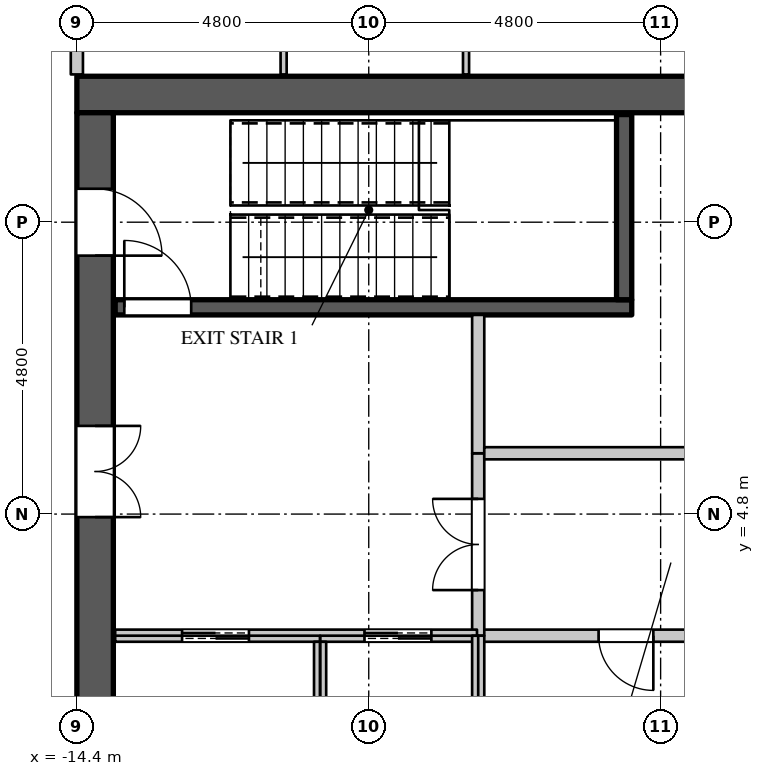
"""IFC4 building model, lengths in metres.
Left out: names, types, materials, properties, quantities, classifications, styles, units other than length and angle.
Written with IfcOpenShell. Run it as: python <this file> out.ifc"""

import sys

from ifc_helpers import new_model, si_unit, direction, frame, frame_2d, origin, place, context, subcontext, project, spatial, rectangle, extrude, element, fill, save


model = new_model("IFC4")
c1 = context("Model", 3, precision=1e-05, world=origin(), true_north=direction((0.0, 1.0)))
c2 = subcontext(c1, "Body", "Model", "MODEL_VIEW")
j1 = project(units=[si_unit("LENGTHUNIT", "METRE"), si_unit("PLANEANGLEUNIT", "RADIAN")], contexts=[c1])
p1 = place(None, origin())
s1 = spatial("IfcSite", under=j1, at=p1, CompositionType="ELEMENT")
p2 = place(p1, origin())
s2 = spatial("IfcBuilding", under=s1, at=p2, CompositionType="ELEMENT")
p3 = place(p2, frame((0.0, 0.0, 272.7)))
s3 = spatial("IfcBuildingStorey", under=s2, at=p3, CompositionType="ELEMENT", Elevation=272.7)
p4 = place(p3, frame((-14.4, 11.7, 0.0), z_axis=(0.0, 0.0, 1.0), x_axis=(1.0, 0.0, 0.0)))
e1 = element("IfcWall", 1, at=p4, inside=s3, PredefinedType="SHEAR", context=c2, shape_type="SweptSolid", body=[
    extrude(rectangle(XDim=28.8, YDim=0.6, at=frame_2d((14.4, 0.0))), origin(), (0.0, 0.0, 1.0), 4.2),
])
p5 = place(p3, frame((-14.1, -11.4, 0.0), z_axis=(0.0, 0.0, 1.0), x_axis=(0.0, 1.0, 0.0)))
e2 = element("IfcWall", 2, at=p5, inside=s3, PredefinedType="SHEAR", context=c2, shape_type="SweptSolid", body=[
    extrude(rectangle(XDim=22.8, YDim=0.6, at=frame_2d((11.4, 0.0))), origin(), (0.0, 0.0, 1.0), 4.2),
])
p6 = place(p5, frame((20.45, 0.0, 0.0)))
e3 = element("IfcOpeningElement", 3, at=p6, cuts=e2, PredefinedType="OPENING", context=c2, shape_type="SweptSolid", body=[
    extrude(rectangle(XDim=1.1, YDim=2.2, at=frame_2d((0.55, 1.1))), frame((0.0, 0.31, 0.0), z_axis=(0.0, -1.0, 0.0), x_axis=(1.0, 0.0, 0.0)), (0.0, 0.0, 1.0), 0.62),
])
p7 = place(p5, frame((1.25, 0.0, 0.0)))
e4 = element("IfcOpeningElement", 4, at=p7, cuts=e2, PredefinedType="OPENING", context=c2, shape_type="SweptSolid", body=[
    extrude(rectangle(XDim=1.1, YDim=2.2, at=frame_2d((0.55, 1.1))), frame((0.0, 0.31, 0.0), z_axis=(0.0, -1.0, 0.0), x_axis=(1.0, 0.0, 0.0)), (0.0, 0.0, 1.0), 0.62),
])
p8 = place(p5, frame((16.15, 0.0, 0.0)))
e5 = element("IfcOpeningElement", 5, at=p8, cuts=e2, PredefinedType="OPENING", context=c2, shape_type="SweptSolid", body=[
    extrude(rectangle(XDim=1.5, YDim=2.4, at=frame_2d((0.75, 1.2))), frame((0.0, 0.31, 0.0), z_axis=(0.0, -1.0, 0.0), x_axis=(1.0, 0.0, 0.0)), (0.0, 0.0, 1.0), 0.62),
])
p9 = place(p5, frame((5.15, 0.0, 0.0)))
e6 = element("IfcOpeningElement", 6, at=p9, cuts=e2, PredefinedType="OPENING", context=c2, shape_type="SweptSolid", body=[
    extrude(rectangle(XDim=1.5, YDim=2.4, at=frame_2d((0.75, 1.2))), frame((0.0, 0.31, 0.0), z_axis=(0.0, -1.0, 0.0), x_axis=(1.0, 0.0, 0.0)), (0.0, 0.0, 1.0), 0.62),
])
p10 = place(p3, frame((-14.4, 12.03, 0.0), z_axis=(0.0, 0.0, 1.0), x_axis=(0.0, 1.0, 0.0)))
e7 = element("IfcWall", 7, at=p10, inside=s3, PredefinedType="PARTITIONING", context=c2, shape_type="SweptSolid", body=[
    extrude(rectangle(XDim=2.27, YDim=0.2, at=frame_2d((1.135, 0.0))), origin(), (0.0, 0.0, 1.0), 3.95),
])
p11 = place(p3, frame((-7.82, 2.8, 0.0), z_axis=(0.0, 0.0, 1.0), x_axis=(1.0, 0.0, 0.0)))
e8 = element("IfcWall", 8, at=p11, inside=s3, PredefinedType="PARTITIONING", context=c2, shape_type="SweptSolid", body=[
    extrude(rectangle(XDim=18.24, YDim=0.2, at=frame_2d((9.12, 0.0))), origin(), (0.0, 0.0, 1.0), 3.95),
])
p12 = place(p11, frame((2.0, 0.0, 0.0)))
e9 = element("IfcOpeningElement", 9, at=p12, cuts=e8, PredefinedType="OPENING", context=c2, shape_type="SweptSolid", body=[
    extrude(rectangle(XDim=0.9, YDim=2.2, at=frame_2d((0.45, 1.1))), frame((0.0, 0.11, 0.0), z_axis=(0.0, -1.0, 0.0), x_axis=(1.0, 0.0, 0.0)), (0.0, 0.0, 1.0), 0.22),
])
p13 = place(p11, frame((6.25, 0.0, 0.0)))
e10 = element("IfcOpeningElement", 10, at=p13, cuts=e8, PredefinedType="OPENING", context=c2, shape_type="SweptSolid", body=[
    extrude(rectangle(XDim=0.9, YDim=2.2, at=frame_2d((0.45, 1.1))), frame((0.0, 0.11, 0.0), z_axis=(0.0, -1.0, 0.0), x_axis=(1.0, 0.0, 0.0)), (0.0, 0.0, 1.0), 0.22),
])
p14 = place(p11, frame((9.65, 0.0, 0.0)))
e11 = element("IfcOpeningElement", 11, at=p14, cuts=e8, PredefinedType="OPENING", context=c2, shape_type="SweptSolid", body=[
    extrude(rectangle(XDim=0.9, YDim=2.2, at=frame_2d((0.45, 1.1))), frame((0.0, 0.11, 0.0), z_axis=(0.0, -1.0, 0.0), x_axis=(1.0, 0.0, 0.0)), (0.0, 0.0, 1.0), 0.22),
])
p15 = place(p11, frame((12.35, 0.0, 0.0)))
e12 = element("IfcOpeningElement", 12, at=p15, cuts=e8, PredefinedType="OPENING", context=c2, shape_type="SweptSolid", body=[
    extrude(rectangle(XDim=0.9, YDim=2.2, at=frame_2d((0.45, 1.1))), frame((0.0, 0.11, 0.0), z_axis=(0.0, -1.0, 0.0), x_axis=(1.0, 0.0, 0.0)), (0.0, 0.0, 1.0), 0.22),
])
p16 = place(p11, frame((15.6, 0.0, 0.0)))
e13 = element("IfcOpeningElement", 13, at=p16, cuts=e8, PredefinedType="OPENING", context=c2, shape_type="SweptSolid", body=[
    extrude(rectangle(XDim=0.9, YDim=2.2, at=frame_2d((0.45, 1.1))), frame((0.0, 0.11, 0.0), z_axis=(0.0, -1.0, 0.0), x_axis=(1.0, 0.0, 0.0)), (0.0, 0.0, 1.0), 0.22),
])
p17 = place(p3, frame((-7.8, 2.8, 0.0), z_axis=(0.0, 0.0, 1.0), x_axis=(0.0, 1.0, 0.0)))
e14 = element("IfcWall", 14, at=p17, inside=s3, PredefinedType="PARTITIONING", context=c2, shape_type="SweptSolid", body=[
    extrude(rectangle(XDim=3.0, YDim=0.2, at=frame_2d((1.5, 0.0))), origin(), (0.0, 0.0, 1.0), 3.95),
])
p18 = place(p17, frame((0.75, 0.0, 0.0)))
e15 = element("IfcOpeningElement", 15, at=p18, cuts=e14, PredefinedType="OPENING", context=c2, shape_type="SweptSolid", body=[
    extrude(rectangle(XDim=1.5, YDim=2.4, at=frame_2d((0.75, 1.2))), frame((0.0, 0.11, 0.0), z_axis=(0.0, -1.0, 0.0), x_axis=(1.0, 0.0, 0.0)), (0.0, 0.0, 1.0), 0.22),
])
p19 = place(p3, frame((-7.8, 5.8, 0.0), z_axis=(0.0, 0.0, 1.0), x_axis=(0.0, 1.0, 0.0)))
e16 = element("IfcWall", 16, at=p19, inside=s3, PredefinedType="PARTITIONING", context=c2, shape_type="SweptSolid", body=[
    extrude(rectangle(XDim=2.275, YDim=0.2, at=frame_2d((1.137, 0.0))), origin(), (0.0, 0.0, 1.0), 3.95),
])
p20 = place(p3, frame((-7.7, 5.8, 0.0), z_axis=(0.0, 0.0, 1.0), x_axis=(1.0, 0.0, 0.0)))
e17 = element("IfcWall", 17, at=p20, inside=s3, PredefinedType="PARTITIONING", context=c2, shape_type="SweptSolid", body=[
    extrude(rectangle(XDim=8.68, YDim=0.2, at=frame_2d((4.34, 0.0))), origin(), (0.0, 0.0, 1.0), 3.95),
])
p21 = place(p20, frame((3.9, 0.0, 0.0)))
e18 = element("IfcOpeningElement", 18, at=p21, cuts=e17, PredefinedType="OPENING", context=c2, shape_type="SweptSolid", body=[
    extrude(rectangle(XDim=0.9, YDim=2.2, at=frame_2d((0.45, 1.1))), frame((0.0, 0.11, 0.0), z_axis=(0.0, -1.0, 0.0), x_axis=(1.0, 0.0, 0.0)), (0.0, 0.0, 1.0), 0.22),
])
p22 = place(p3, frame((-13.77, 2.8, 0.0), z_axis=(0.0, 0.0, 1.0), x_axis=(1.0, 0.0, 0.0)))
e19 = element("IfcWall", 19, at=p22, inside=s3, PredefinedType="PARTITIONING", context=c2, shape_type="SweptSolid", body=[
    extrude(rectangle(XDim=5.95, YDim=0.2, at=frame_2d((2.975, 0.0))), origin(), (0.0, 0.0, 1.0), 3.95),
])
p23 = place(p22, frame((1.1, 0.0, 0.0)))
e20 = element("IfcOpeningElement", 20, at=p23, cuts=e19, PredefinedType="OPENING", context=c2, shape_type="SweptSolid", body=[
    extrude(rectangle(XDim=1.1, YDim=2.2, at=frame_2d((0.55, 1.1))), frame((0.0, 0.11, 0.0), z_axis=(0.0, -1.0, 0.0), x_axis=(1.0, 0.0, 0.0)), (0.0, 0.0, 1.0), 0.22),
])
p24 = place(p22, frame((4.1, 0.0, 0.0)))
e21 = element("IfcOpeningElement", 21, at=p24, cuts=e19, PredefinedType="OPENING", context=c2, shape_type="SweptSolid", body=[
    extrude(rectangle(XDim=1.1, YDim=2.2, at=frame_2d((0.55, 1.1))), frame((0.0, 0.11, 0.0), z_axis=(0.0, -1.0, 0.0), x_axis=(1.0, 0.0, 0.0)), (0.0, 0.0, 1.0), 0.22),
])
p25 = place(p3, frame((-10.4, 0.0, 0.0), z_axis=(0.0, 0.0, 1.0), x_axis=(0.0, 1.0, 0.0)))
e22 = element("IfcWall", 22, at=p25, inside=s3, PredefinedType="PARTITIONING", context=c2, shape_type="SweptSolid", body=[
    extrude(rectangle(XDim=2.7, YDim=0.2, at=frame_2d((1.35, 0.0))), origin(), (0.0, 0.0, 1.0), 3.95),
])
p26 = place(p3, frame((-7.8, 0.0, 0.0), z_axis=(0.0, 0.0, 1.0), x_axis=(0.0, 1.0, 0.0)))
e23 = element("IfcWall", 23, at=p26, inside=s3, PredefinedType="PARTITIONING", context=c2, shape_type="SweptSolid", body=[
    extrude(rectangle(XDim=2.8, YDim=0.2, at=frame_2d((1.4, 0.0))), origin(), (0.0, 0.0, 1.0), 3.95),
])
p27 = place(p3, frame((-13.77, 8.2, 0.0), z_axis=(0.0, 0.0, 1.0), x_axis=(1.0, 0.0, 0.0)))
e24 = element("IfcWall", 24, at=p27, inside=s3, PredefinedType="SHEAR", context=c2, shape_type="SweptSolid", body=[
    extrude(rectangle(XDim=8.495, YDim=0.25, at=frame_2d((4.248, 0.0))), origin(), (0.0, 0.0, 1.0), 3.95),
])
p28 = place(p27, frame((0.15, 0.0, 0.0)))
e25 = element("IfcOpeningElement", 25, at=p28, cuts=e24, PredefinedType="OPENING", context=c2, shape_type="SweptSolid", body=[
    extrude(rectangle(XDim=1.1, YDim=2.2, at=frame_2d((0.55, 1.1))), frame((0.0, 0.135, 0.0), z_axis=(0.0, -1.0, 0.0), x_axis=(1.0, 0.0, 0.0)), (0.0, 0.0, 1.0), 0.27),
])
p29 = place(p3, frame((-5.4, 8.325, 0.0), z_axis=(0.0, 0.0, 1.0), x_axis=(0.0, 1.0, 0.0)))
e26 = element("IfcWall", 26, at=p29, inside=s3, PredefinedType="SHEAR", context=c2, shape_type="SweptSolid", body=[
    extrude(rectangle(XDim=3.045, YDim=0.25, at=frame_2d((1.522, 0.0))), origin(), (0.0, 0.0, 1.0), 3.95),
])
p30 = place(p3, frame((-11.0, 12.03, 0.0), z_axis=(0.0, 0.0, 1.0), x_axis=(0.0, 1.0, 0.0)))
e27 = element("IfcWall", 27, at=p30, inside=s3, PredefinedType="PARTITIONING", context=c2, shape_type="SweptSolid", body=[
    extrude(rectangle(XDim=6.395, YDim=0.1, at=frame_2d((3.198, 0.0))), origin(), (0.0, 0.0, 1.0), 3.95),
])
p31 = place(p3, frame((-8.0, 12.03, 0.0), z_axis=(0.0, 0.0, 1.0), x_axis=(0.0, 1.0, 0.0)))
e28 = element("IfcWall", 28, at=p31, inside=s3, PredefinedType="PARTITIONING", context=c2, shape_type="SweptSolid", body=[
    extrude(rectangle(XDim=6.395, YDim=0.1, at=frame_2d((3.198, 0.0))), origin(), (0.0, 0.0, 1.0), 3.95),
])
p32 = place(p31, frame((2.75, 0.0, 0.0)))
e29 = element("IfcOpeningElement", 29, at=p32, cuts=e28, PredefinedType="OPENING", context=c2, shape_type="SweptSolid", body=[
    extrude(rectangle(XDim=0.9, YDim=2.2, at=frame_2d((0.45, 1.1))), frame((0.0, 0.06, 0.0), z_axis=(0.0, -1.0, 0.0), x_axis=(1.0, 0.0, 0.0)), (0.0, 0.0, 1.0), 0.12),
])
p33 = place(p12, origin())
e30 = element("IfcDoor", 30, at=p33, inside=s3, OperationType="SINGLE_SWING_LEFT", PredefinedType="DOOR", context=c2, shape_type="SweptSolid", body=[
    extrude(rectangle(XDim=0.9, YDim=2.2, at=frame_2d((0.45, 1.1))), frame((0.0, 0.025, 0.0), z_axis=(0.0, -1.0, 0.0), x_axis=(1.0, 0.0, 0.0)), (0.0, 0.0, 1.0), 0.05),
])
fill(e9, e30)
p34 = place(p23, origin())
e31 = element("IfcDoor", 31, at=p34, inside=s3, OperationType="DOUBLE_DOOR_SLIDING", PredefinedType="DOOR", context=c2, shape_type="SweptSolid", body=[
    extrude(rectangle(XDim=1.1, YDim=2.2, at=frame_2d((0.55, 1.1))), frame((0.0, 0.025, 0.0), z_axis=(0.0, -1.0, 0.0), x_axis=(1.0, 0.0, 0.0)), (0.0, 0.0, 1.0), 0.05),
])
fill(e20, e31)
p35 = place(p24, origin())
e32 = element("IfcDoor", 32, at=p35, inside=s3, OperationType="DOUBLE_DOOR_SLIDING", PredefinedType="DOOR", context=c2, shape_type="SweptSolid", body=[
    extrude(rectangle(XDim=1.1, YDim=2.2, at=frame_2d((0.55, 1.1))), frame((0.0, 0.025, 0.0), z_axis=(0.0, -1.0, 0.0), x_axis=(1.0, 0.0, 0.0)), (0.0, 0.0, 1.0), 0.05),
])
fill(e21, e32)
p36 = place(p28, origin())
e33 = element("IfcDoor", 33, at=p36, inside=s3, OperationType="SINGLE_SWING_LEFT", PredefinedType="DOOR", context=c2, shape_type="SweptSolid", body=[
    extrude(rectangle(XDim=1.1, YDim=2.2, at=frame_2d((0.55, 1.1))), frame((0.0, 0.025, 0.0), z_axis=(0.0, -1.0, 0.0), x_axis=(1.0, 0.0, 0.0)), (0.0, 0.0, 1.0), 0.05),
])
fill(e25, e33)
p37 = place(p18, origin())
e34 = element("IfcDoor", 34, at=p37, inside=s3, OperationType="DOUBLE_DOOR_SINGLE_SWING", PredefinedType="DOOR", context=c2, shape_type="SweptSolid", body=[
    extrude(rectangle(XDim=1.5, YDim=2.4, at=frame_2d((0.75, 1.2))), frame((0.0, 0.025, 0.0), z_axis=(0.0, -1.0, 0.0), x_axis=(1.0, 0.0, 0.0)), (0.0, 0.0, 1.0), 0.05),
])
fill(e15, e34)
p38 = place(p6, origin())
e35 = element("IfcDoor", 35, at=p38, inside=s3, OperationType="SINGLE_SWING_RIGHT", PredefinedType="DOOR", context=c2, shape_type="SweptSolid", body=[
    extrude(rectangle(XDim=1.1, YDim=2.2, at=frame_2d((0.55, 1.1))), frame((0.0, -0.245, 0.0), z_axis=(0.0, -1.0, 0.0), x_axis=(1.0, 0.0, 0.0)), (0.0, 0.0, 1.0), 0.05),
])
fill(e3, e35)
p39 = place(p8, origin())
e36 = element("IfcDoor", 36, at=p39, inside=s3, OperationType="DOUBLE_DOOR_SINGLE_SWING", PredefinedType="DOOR", context=c2, shape_type="SweptSolid", body=[
    extrude(rectangle(XDim=1.5, YDim=2.4, at=frame_2d((0.75, 1.2))), frame((0.0, -0.245, 0.0), z_axis=(0.0, -1.0, 0.0), x_axis=(1.0, 0.0, 0.0)), (0.0, 0.0, 1.0), 0.05),
])
fill(e5, e36)
save(model, sys.argv[1])
